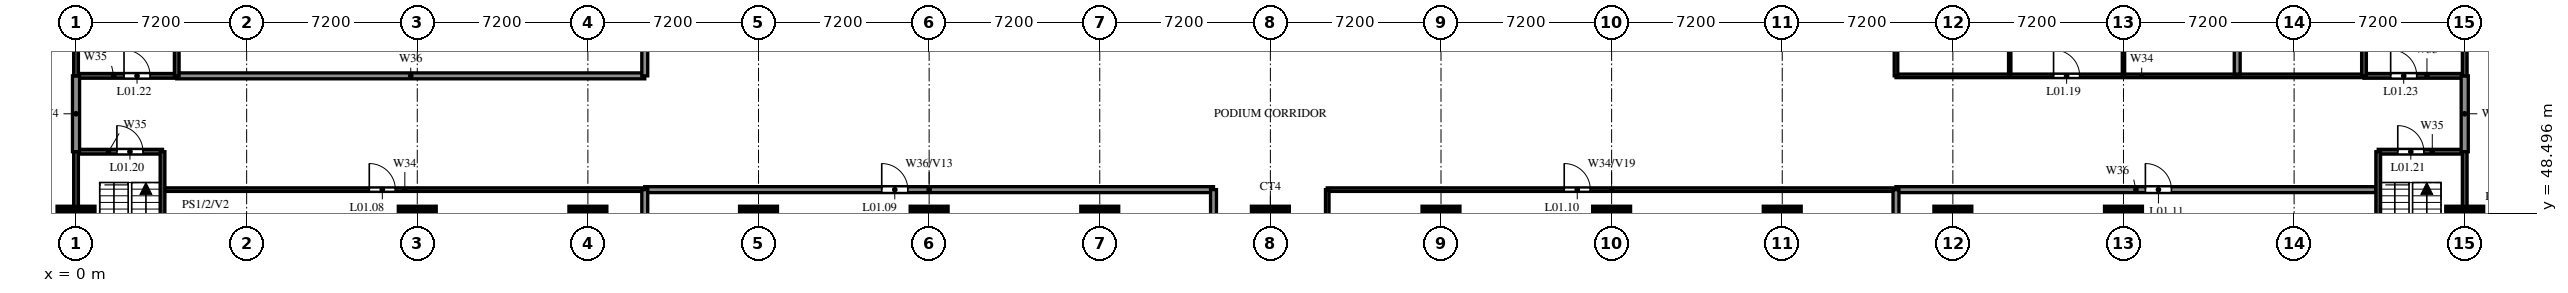
"""IFC4 building model, lengths in metres.
Left out: names, types, materials, properties, quantities, classifications, styles, units other than length and angle.
Written with IfcOpenShell. Run it as: python <this file> out.ifc"""

import sys

from ifc_helpers import new_model, si_unit, direction, frame, frame_2d, origin, origin_2d, place, context, subcontext, project, spatial, rectangle, circle, extrude, source, transform, mapped, element, fill, save


model = new_model("IFC4")
c1 = context("Model", 3, precision=1e-05, world=origin(), true_north=direction((0.0, 1.0)))
c2 = subcontext(c1, "Body", "Model", "MODEL_VIEW")
j1 = project(units=[si_unit("LENGTHUNIT", "METRE"), si_unit("PLANEANGLEUNIT", "RADIAN")], contexts=[c1])
p1 = place(None, origin())
s1 = spatial("IfcSite", under=j1, at=p1, CompositionType="ELEMENT")
p2 = place(p1, origin())
s2 = spatial("IfcBuilding", under=s1, at=p2, CompositionType="ELEMENT")
p3 = place(p2, frame((0.0, 0.0, 7.8)))
s3 = spatial("IfcBuildingStorey", under=s2, at=p3, CompositionType="ELEMENT", Elevation=7.8)
m1 = source(origin(), c2, "Body", "SweptSolid", [
    extrude(circle(Radius=0.8, at=origin_2d()), origin(), (0.0, 0.0, 1.0), 5.0),
])
for number, where, z_axis, x_axis in (
    (1, (0.0, 48.0, 0.0), (0.0, 0.0, 1.0), (1.0, 0.0, 0.0)),
    (2, (14.4, 48.0, 0.0), (0.0, 0.0, 1.0), (1.0, 0.0, 0.0)),
    (3, (21.6, 48.0, 0.0), (0.0, 0.0, 1.0), (1.0, 0.0, 0.0)),
    (4, (28.8, 48.0, 0.0), (0.0, 0.0, 1.0), (1.0, 0.0, 0.0)),
    (5, (36.0, 48.0, 0.0), (0.0, 0.0, 1.0), (1.0, 0.0, 0.0)),
    (6, (43.2, 48.0, 0.0), (0.0, 0.0, 1.0), (1.0, 0.0, 0.0)),
    (7, (50.4, 48.0, 0.0), (0.0, 0.0, 1.0), (1.0, 0.0, 0.0)),
    (8, (57.6, 48.0, 0.0), (0.0, 0.0, 1.0), (1.0, 0.0, 0.0)),
    (9, (64.8, 48.0, 0.0), (0.0, 0.0, 1.0), (1.0, 0.0, 0.0)),
    (10, (72.0, 48.0, 0.0), (0.0, 0.0, 1.0), (1.0, 0.0, 0.0)),
    (11, (79.2, 48.0, 0.0), (0.0, 0.0, 1.0), (1.0, 0.0, 0.0)),
    (12, (86.4, 48.0, 0.0), (0.0, 0.0, 1.0), (1.0, 0.0, 0.0)),
    (13, (100.8, 48.0, 0.0), (0.0, 0.0, 1.0), (1.0, 0.0, 0.0)),
):
    element("IfcColumn", number, at=place(p3, frame(where, z_axis=z_axis, x_axis=x_axis)), inside=s3, PredefinedType="COLUMN", context=c2, shape_type="MappedRepresentation", body=[
        mapped(m1, transform((0.0, 0.0, 0.0))),
    ])
p4 = place(p3, frame((3.75, 49.5, 0.0), z_axis=(0.0, 0.0, 1.0), x_axis=(1.0, 0.0, 0.0)))
e14 = element("IfcWall", 14, at=p4, inside=s3, PredefinedType="PARTITIONING", context=c2, shape_type="SweptSolid", body=[
    extrude(rectangle(XDim=20.25, YDim=0.15, at=frame_2d((10.125, 0.0))), origin(), (0.0, 0.0, 1.0), 3.8),
])
p5 = place(p4, frame((8.625, 0.0, 0.0)))
e15 = element("IfcOpeningElement", 15, at=p5, cuts=e14, PredefinedType="OPENING", context=c2, shape_type="SweptSolid", body=[
    extrude(rectangle(XDim=1.1, YDim=2.1, at=frame_2d((0.55, 1.05))), frame((0.0, 0.085, 0.0), z_axis=(0.0, -1.0, 0.0), x_axis=(1.0, 0.0, 0.0)), (0.0, 0.0, 1.0), 0.17),
])
p6 = place(p3, frame((52.8, 49.5, 0.0), z_axis=(0.0, 0.0, 1.0), x_axis=(1.0, 0.0, 0.0)))
e16 = element("IfcWall", 16, at=p6, inside=s3, PredefinedType="PARTITIONING", context=c2, shape_type="SweptSolid", body=[
    extrude(rectangle(XDim=24.0, YDim=0.15, at=frame_2d((12.0, 0.0))), origin(), (0.0, 0.0, 1.0), 5.0),
])
p7 = place(p6, frame((10.0, 0.0, 0.0)))
e17 = element("IfcOpeningElement", 17, at=p7, cuts=e16, PredefinedType="OPENING", context=c2, shape_type="SweptSolid", body=[
    extrude(rectangle(XDim=1.1, YDim=2.1, at=frame_2d((0.55, 1.05))), frame((0.0, 0.085, 0.0), z_axis=(0.0, -1.0, 0.0), x_axis=(1.0, 0.0, 0.0)), (0.0, 0.0, 1.0), 0.17),
])
p8 = place(p3, frame((24.0, 49.5, 0.0), z_axis=(0.0, 0.0, 1.0), x_axis=(1.0, 0.0, 0.0)))
e18 = element("IfcWall", 18, at=p8, inside=s3, PredefinedType="SOLIDWALL", context=c2, shape_type="SweptSolid", body=[
    extrude(rectangle(XDim=24.0, YDim=0.25, at=frame_2d((12.0, 0.0))), origin(), (0.0, 0.0, 1.0), 5.0),
])
p9 = place(p8, frame((10.0, 0.0, 0.0)))
e19 = element("IfcOpeningElement", 19, at=p9, cuts=e18, PredefinedType="OPENING", context=c2, shape_type="SweptSolid", body=[
    extrude(rectangle(XDim=1.1, YDim=2.1, at=frame_2d((0.55, 1.05))), frame((0.0, 0.135, 0.0), z_axis=(0.0, -1.0, 0.0), x_axis=(1.0, 0.0, 0.0)), (0.0, 0.0, 1.0), 0.27),
])
p10 = place(p3, frame((76.8, 49.5, 0.0), z_axis=(0.0, 0.0, 1.0), x_axis=(1.0, 0.0, 0.0)))
e20 = element("IfcWall", 20, at=p10, inside=s3, PredefinedType="SOLIDWALL", context=c2, shape_type="SweptSolid", body=[
    extrude(rectangle(XDim=20.25, YDim=0.25, at=frame_2d((10.125, 0.0))), origin(), (0.0, 0.0, 1.0), 3.8),
])
p11 = place(p10, frame((10.525, 0.0, 0.0)))
e21 = element("IfcOpeningElement", 21, at=p11, cuts=e20, PredefinedType="OPENING", context=c2, shape_type="SweptSolid", body=[
    extrude(rectangle(XDim=1.1, YDim=2.1, at=frame_2d((0.55, 1.05))), frame((0.0, 0.135, 0.0), z_axis=(0.0, -1.0, 0.0), x_axis=(1.0, 0.0, 0.0)), (0.0, 0.0, 1.0), 0.27),
])
p12 = place(p3, frame((0.0, 51.1, 0.0), z_axis=(0.0, 0.0, 1.0), x_axis=(1.0, 0.0, 0.0)))
e22 = element("IfcWall", 22, at=p12, inside=s3, PredefinedType="SOLIDWALL", context=c2, shape_type="SweptSolid", body=[
    extrude(rectangle(XDim=3.65, YDim=0.2, at=frame_2d((1.825, 0.0))), origin(), (0.0, 0.0, 1.0), 5.0),
])
p13 = place(p12, frame((1.725, 0.0, 0.0)))
e23 = element("IfcOpeningElement", 23, at=p13, cuts=e22, PredefinedType="OPENING", context=c2, shape_type="SweptSolid", body=[
    extrude(rectangle(XDim=1.1, YDim=2.1, at=frame_2d((0.55, 1.05))), frame((0.0, 0.11, 0.0), z_axis=(0.0, -1.0, 0.0), x_axis=(1.0, 0.0, 0.0)), (0.0, 0.0, 1.0), 0.22),
])
p14 = place(p3, frame((97.15, 51.1, 0.0), z_axis=(0.0, 0.0, 1.0), x_axis=(1.0, 0.0, 0.0)))
e24 = element("IfcWall", 24, at=p14, inside=s3, PredefinedType="SOLIDWALL", context=c2, shape_type="SweptSolid", body=[
    extrude(rectangle(XDim=3.65, YDim=0.2, at=frame_2d((1.825, 0.0))), origin(), (0.0, 0.0, 1.0), 5.0),
])
p15 = place(p14, frame((0.825, 0.0, 0.0)))
e25 = element("IfcOpeningElement", 25, at=p15, cuts=e24, PredefinedType="OPENING", context=c2, shape_type="SweptSolid", body=[
    extrude(rectangle(XDim=1.1, YDim=2.1, at=frame_2d((0.55, 1.05))), frame((0.0, 0.11, 0.0), z_axis=(0.0, -1.0, 0.0), x_axis=(1.0, 0.0, 0.0)), (0.0, 0.0, 1.0), 0.22),
])
p16 = place(p3, frame((76.8, 54.3, 0.0), z_axis=(0.0, 0.0, 1.0), x_axis=(1.0, 0.0, 0.0)))
e26 = element("IfcWall", 26, at=p16, inside=s3, PredefinedType="PARTITIONING", context=c2, shape_type="SweptSolid", body=[
    extrude(rectangle(XDim=19.75, YDim=0.15, at=frame_2d((9.875, 0.0))), origin(), (0.0, 0.0, 1.0), 3.8),
])
p17 = place(p16, frame((6.65, 0.0, 0.0)))
e27 = element("IfcOpeningElement", 27, at=p17, cuts=e26, PredefinedType="OPENING", context=c2, shape_type="SweptSolid", body=[
    extrude(rectangle(XDim=1.1, YDim=2.1, at=frame_2d((0.55, 1.05))), frame((0.0, 0.085, 0.0), z_axis=(0.0, -1.0, 0.0), x_axis=(1.0, 0.0, 0.0)), (0.0, 0.0, 1.0), 0.17),
])
p18 = place(p3, frame((0.0, 54.3, 0.0), z_axis=(0.0, 0.0, 1.0), x_axis=(1.0, 0.0, 0.0)))
e28 = element("IfcWall", 28, at=p18, inside=s3, PredefinedType="SOLIDWALL", context=c2, shape_type="SweptSolid", body=[
    extrude(rectangle(XDim=4.25, YDim=0.2, at=frame_2d((2.125, 0.0))), origin(), (0.0, 0.0, 1.0), 5.0),
])
p19 = place(p18, frame((2.025, 0.0, 0.0)))
e29 = element("IfcOpeningElement", 29, at=p19, cuts=e28, PredefinedType="OPENING", context=c2, shape_type="SweptSolid", body=[
    extrude(rectangle(XDim=1.1, YDim=2.1, at=frame_2d((0.55, 1.05))), frame((0.0, 0.11, 0.0), z_axis=(0.0, -1.0, 0.0), x_axis=(1.0, 0.0, 0.0)), (0.0, 0.0, 1.0), 0.22),
])
p20 = place(p3, frame((96.55, 54.3, 0.0), z_axis=(0.0, 0.0, 1.0), x_axis=(1.0, 0.0, 0.0)))
e30 = element("IfcWall", 30, at=p20, inside=s3, PredefinedType="SOLIDWALL", context=c2, shape_type="SweptSolid", body=[
    extrude(rectangle(XDim=4.25, YDim=0.2, at=frame_2d((2.125, 0.0))), origin(), (0.0, 0.0, 1.0), 5.0),
])
p21 = place(p20, frame((1.125, 0.0, 0.0)))
e31 = element("IfcOpeningElement", 31, at=p21, cuts=e30, PredefinedType="OPENING", context=c2, shape_type="SweptSolid", body=[
    extrude(rectangle(XDim=1.1, YDim=2.1, at=frame_2d((0.55, 1.05))), frame((0.0, 0.11, 0.0), z_axis=(0.0, -1.0, 0.0), x_axis=(1.0, 0.0, 0.0)), (0.0, 0.0, 1.0), 0.22),
])
p22 = place(p3, frame((4.25, 54.3, 0.0), z_axis=(0.0, 0.0, 1.0), x_axis=(1.0, 0.0, 0.0)))
e32 = element("IfcWall", 32, at=p22, inside=s3, PredefinedType="SOLIDWALL", context=c2, shape_type="SweptSolid", body=[
    extrude(rectangle(XDim=19.75, YDim=0.25, at=frame_2d((9.875, 0.0))), origin(), (0.0, 0.0, 1.0), 3.8),
])
p23 = place(p3, frame((0.0, 51.1, 0.0), z_axis=(0.0, 0.0, 1.0), x_axis=(0.0, 1.0, 0.0)))
e33 = element("IfcWall", 33, at=p23, inside=s3, PredefinedType="SOLIDWALL", context=c2, shape_type="SweptSolid", body=[
    extrude(rectangle(XDim=3.2, YDim=0.3, at=frame_2d((1.6, 0.0))), origin(), (0.0, 0.0, 1.0), 5.0),
])
p24 = place(p3, frame((0.0, 42.9, 0.0), z_axis=(0.0, 0.0, 1.0), x_axis=(0.0, 1.0, 0.0)))
e34 = element("IfcWall", 34, at=p24, inside=s3, PredefinedType="SOLIDWALL", context=c2, shape_type="SweptSolid", body=[
    extrude(rectangle(XDim=8.2, YDim=0.2, at=frame_2d((4.1, 0.0))), origin(), (0.0, 0.0, 1.0), 5.0),
])
p25 = place(p3, frame((0.0, 54.3, 0.0), z_axis=(0.0, 0.0, 1.0), x_axis=(0.0, 1.0, 0.0)))
e35 = element("IfcWall", 35, at=p25, inside=s3, PredefinedType="SOLIDWALL", context=c2, shape_type="SweptSolid", body=[
    extrude(rectangle(XDim=8.8, YDim=0.2, at=frame_2d((4.4, 0.0))), origin(), (0.0, 0.0, 1.0), 5.0),
])
p26 = place(p3, frame((3.65, 42.9, 0.0), z_axis=(0.0, 0.0, 1.0), x_axis=(0.0, 1.0, 0.0)))
e36 = element("IfcWall", 36, at=p26, inside=s3, PredefinedType="SOLIDWALL", context=c2, shape_type="SweptSolid", body=[
    extrude(rectangle(XDim=8.2, YDim=0.2, at=frame_2d((4.1, 0.0))), origin(), (0.0, 0.0, 1.0), 5.0),
])
p27 = place(p3, frame((4.25, 54.3, 0.0), z_axis=(0.0, 0.0, 1.0), x_axis=(0.0, 1.0, 0.0)))
e37 = element("IfcWall", 37, at=p27, inside=s3, PredefinedType="SOLIDWALL", context=c2, shape_type="SweptSolid", body=[
    extrude(rectangle(XDim=8.8, YDim=0.2, at=frame_2d((4.4, 0.0))), origin(), (0.0, 0.0, 1.0), 5.0),
])
p28 = place(p3, frame((24.0, 30.0, 0.0), z_axis=(0.0, 0.0, 1.0), x_axis=(0.0, 1.0, 0.0)))
e38 = element("IfcWall", 38, at=p28, inside=s3, PredefinedType="SOLIDWALL", context=c2, shape_type="SweptSolid", body=[
    extrude(rectangle(XDim=19.5, YDim=0.25, at=frame_2d((9.75, 0.0))), origin(), (0.0, 0.0, 1.0), 4.1),
])
p29 = place(p3, frame((24.0, 54.3, 0.0), z_axis=(0.0, 0.0, 1.0), x_axis=(0.0, 1.0, 0.0)))
e39 = element("IfcWall", 39, at=p29, inside=s3, PredefinedType="SOLIDWALL", context=c2, shape_type="SweptSolid", body=[
    extrude(rectangle(XDim=15.9, YDim=0.25, at=frame_2d((7.95, 0.0))), origin(), (0.0, 0.0, 1.0), 5.0),
])
p30 = place(p29, frame((7.4, 0.0, 0.0)))
e40 = element("IfcOpeningElement", 40, at=p30, cuts=e39, PredefinedType="OPENING", context=c2, shape_type="SweptSolid", body=[
    extrude(rectangle(XDim=1.1, YDim=2.1, at=frame_2d((0.55, 1.05))), frame((0.0, 0.135, 0.0), z_axis=(0.0, -1.0, 0.0), x_axis=(1.0, 0.0, 0.0)), (0.0, 0.0, 1.0), 0.27),
])
p31 = place(p3, frame((48.0, 30.0, 0.0), z_axis=(0.0, 0.0, 1.0), x_axis=(0.0, 1.0, 0.0)))
e41 = element("IfcWall", 41, at=p31, inside=s3, PredefinedType="SOLIDWALL", context=c2, shape_type="SweptSolid", body=[
    extrude(rectangle(XDim=19.5, YDim=0.25, at=frame_2d((9.75, 0.0))), origin(), (0.0, 0.0, 1.0), 4.1),
])
p32 = place(p3, frame((52.8, 30.0, 0.0), z_axis=(0.0, 0.0, 1.0), x_axis=(0.0, 1.0, 0.0)))
e42 = element("IfcWall", 42, at=p32, inside=s3, PredefinedType="PARTITIONING", context=c2, shape_type="SweptSolid", body=[
    extrude(rectangle(XDim=19.5, YDim=0.15, at=frame_2d((9.75, 0.0))), origin(), (0.0, 0.0, 1.0), 4.1),
])
p33 = place(p3, frame((76.8, 54.3, 0.0), z_axis=(0.0, 0.0, 1.0), x_axis=(0.0, 1.0, 0.0)))
e43 = element("IfcWall", 43, at=p33, inside=s3, PredefinedType="PARTITIONING", context=c2, shape_type="SweptSolid", body=[
    extrude(rectangle(XDim=31.95, YDim=0.15, at=frame_2d((15.975, 0.0))), origin(), (0.0, 0.0, 1.0), 3.8),
])
p34 = place(p33, frame((11.0, 0.0, 0.0)))
e44 = element("IfcOpeningElement", 44, at=p34, cuts=e43, PredefinedType="OPENING", context=c2, shape_type="SweptSolid", body=[
    extrude(rectangle(XDim=1.1, YDim=2.1, at=frame_2d((0.55, 1.05))), frame((0.0, 0.085, 0.0), z_axis=(0.0, -1.0, 0.0), x_axis=(1.0, 0.0, 0.0)), (0.0, 0.0, 1.0), 0.17),
])
p35 = place(p33, frame((23.45, 0.0, 0.0)))
e45 = element("IfcOpeningElement", 45, at=p35, cuts=e43, PredefinedType="OPENING", context=c2, shape_type="SweptSolid", body=[
    extrude(rectangle(XDim=1.1, YDim=2.1, at=frame_2d((0.55, 1.05))), frame((0.0, 0.085, 0.0), z_axis=(0.0, -1.0, 0.0), x_axis=(1.0, 0.0, 0.0)), (0.0, 0.0, 1.0), 0.17),
])
p36 = place(p3, frame((76.8, 30.0, 0.0), z_axis=(0.0, 0.0, 1.0), x_axis=(0.0, 1.0, 0.0)))
e46 = element("IfcWall", 46, at=p36, inside=s3, PredefinedType="SOLIDWALL", context=c2, shape_type="SweptSolid", body=[
    extrude(rectangle(XDim=19.5, YDim=0.25, at=frame_2d((9.75, 0.0))), origin(), (0.0, 0.0, 1.0), 4.1),
])
p37 = place(p3, frame((81.6, 54.375, 0.0), z_axis=(0.0, 0.0, 1.0), x_axis=(0.0, 1.0, 0.0)))
e47 = element("IfcWall", 47, at=p37, inside=s3, PredefinedType="PARTITIONING", context=c2, shape_type="SweptSolid", body=[
    extrude(rectangle(XDim=7.0, YDim=0.1, at=frame_2d((3.5, 0.0))), origin(), (0.0, 0.0, 1.0), 5.0),
])
p38 = place(p37, frame((1.525, 0.0, 0.0)))
e48 = element("IfcOpeningElement", 48, at=p38, cuts=e47, PredefinedType="OPENING", context=c2, shape_type="SweptSolid", body=[
    extrude(rectangle(XDim=1.0, YDim=2.1, at=frame_2d((0.5, 1.05))), frame((0.0, 0.06, 0.0), z_axis=(0.0, -1.0, 0.0), x_axis=(1.0, 0.0, 0.0)), (0.0, 0.0, 1.0), 0.12),
])
p39 = place(p37, frame((5.125, 0.0, 0.0)))
e49 = element("IfcOpeningElement", 49, at=p39, cuts=e47, PredefinedType="OPENING", context=c2, shape_type="SweptSolid", body=[
    extrude(rectangle(XDim=1.0, YDim=2.1, at=frame_2d((0.5, 1.05))), frame((0.0, 0.06, 0.0), z_axis=(0.0, -1.0, 0.0), x_axis=(1.0, 0.0, 0.0)), (0.0, 0.0, 1.0), 0.12),
])
p40 = place(p3, frame((86.4, 54.375, 0.0), z_axis=(0.0, 0.0, 1.0), x_axis=(0.0, 1.0, 0.0)))
e50 = element("IfcWall", 50, at=p40, inside=s3, PredefinedType="PARTITIONING", context=c2, shape_type="SweptSolid", body=[
    extrude(rectangle(XDim=7.0, YDim=0.1, at=frame_2d((3.5, 0.0))), origin(), (0.0, 0.0, 1.0), 3.8),
])
p41 = place(p40, frame((3.025, 0.0, 0.0)))
e51 = element("IfcOpeningElement", 51, at=p41, cuts=e50, PredefinedType="OPENING", context=c2, shape_type="SweptSolid", body=[
    extrude(rectangle(XDim=1.0, YDim=2.1, at=frame_2d((0.5, 1.05))), frame((0.0, 0.06, 0.0), z_axis=(0.0, -1.0, 0.0), x_axis=(1.0, 0.0, 0.0)), (0.0, 0.0, 1.0), 0.12),
])
p42 = place(p3, frame((91.2, 54.375, 0.0), z_axis=(0.0, 0.0, 1.0), x_axis=(0.0, 1.0, 0.0)))
e52 = element("IfcWall", 52, at=p42, inside=s3, PredefinedType="SOLIDWALL", context=c2, shape_type="SweptSolid", body=[
    extrude(rectangle(XDim=7.125, YDim=0.25, at=frame_2d((3.562, 0.0))), origin(), (0.0, 0.0, 1.0), 5.0),
])
p43 = place(p3, frame((96.55, 54.3, 0.0), z_axis=(0.0, 0.0, 1.0), x_axis=(0.0, 1.0, 0.0)))
e53 = element("IfcWall", 53, at=p43, inside=s3, PredefinedType="SOLIDWALL", context=c2, shape_type="SweptSolid", body=[
    extrude(rectangle(XDim=8.8, YDim=0.2, at=frame_2d((4.4, 0.0))), origin(), (0.0, 0.0, 1.0), 5.0),
])
p44 = place(p3, frame((97.15, 42.9, 0.0), z_axis=(0.0, 0.0, 1.0), x_axis=(0.0, 1.0, 0.0)))
e54 = element("IfcWall", 54, at=p44, inside=s3, PredefinedType="SOLIDWALL", context=c2, shape_type="SweptSolid", body=[
    extrude(rectangle(XDim=8.2, YDim=0.2, at=frame_2d((4.1, 0.0))), origin(), (0.0, 0.0, 1.0), 5.0),
])
p45 = place(p3, frame((100.8, 51.1, 0.0), z_axis=(0.0, 0.0, 1.0), x_axis=(0.0, 1.0, 0.0)))
e55 = element("IfcWall", 55, at=p45, inside=s3, PredefinedType="SOLIDWALL", context=c2, shape_type="SweptSolid", body=[
    extrude(rectangle(XDim=3.2, YDim=0.3, at=frame_2d((1.6, 0.0))), origin(), (0.0, 0.0, 1.0), 5.0),
])
p46 = place(p3, frame((100.8, 42.9, 0.0), z_axis=(0.0, 0.0, 1.0), x_axis=(0.0, 1.0, 0.0)))
e56 = element("IfcWall", 56, at=p46, inside=s3, PredefinedType="SOLIDWALL", context=c2, shape_type="SweptSolid", body=[
    extrude(rectangle(XDim=8.2, YDim=0.2, at=frame_2d((4.1, 0.0))), origin(), (0.0, 0.0, 1.0), 5.0),
])
p47 = place(p3, frame((100.8, 54.3, 0.0), z_axis=(0.0, 0.0, 1.0), x_axis=(0.0, 1.0, 0.0)))
e57 = element("IfcWall", 57, at=p47, inside=s3, PredefinedType="SOLIDWALL", context=c2, shape_type="SweptSolid", body=[
    extrude(rectangle(XDim=8.8, YDim=0.2, at=frame_2d((4.4, 0.0))), origin(), (0.0, 0.0, 1.0), 5.0),
])
p48 = place(p5, origin())
e58 = element("IfcDoor", 58, at=p48, inside=s3, OperationType="SINGLE_SWING_LEFT", PredefinedType="DOOR", context=c2, shape_type="SweptSolid", body=[
    extrude(rectangle(XDim=1.1, YDim=2.1, at=frame_2d((0.55, 1.05))), frame((0.0, 0.025, 0.0), z_axis=(0.0, -1.0, 0.0), x_axis=(1.0, 0.0, 0.0)), (0.0, 0.0, 1.0), 0.05),
])
fill(e15, e58)
p49 = place(p9, origin())
e59 = element("IfcDoor", 59, at=p49, inside=s3, OperationType="SINGLE_SWING_LEFT", PredefinedType="DOOR", context=c2, shape_type="SweptSolid", body=[
    extrude(rectangle(XDim=1.1, YDim=2.1, at=frame_2d((0.55, 1.05))), frame((0.0, 0.025, 0.0), z_axis=(0.0, -1.0, 0.0), x_axis=(1.0, 0.0, 0.0)), (0.0, 0.0, 1.0), 0.05),
])
fill(e19, e59)
p50 = place(p7, origin())
e60 = element("IfcDoor", 60, at=p50, inside=s3, OperationType="SINGLE_SWING_LEFT", PredefinedType="DOOR", context=c2, shape_type="SweptSolid", body=[
    extrude(rectangle(XDim=1.1, YDim=2.1, at=frame_2d((0.55, 1.05))), frame((0.0, 0.025, 0.0), z_axis=(0.0, -1.0, 0.0), x_axis=(1.0, 0.0, 0.0)), (0.0, 0.0, 1.0), 0.05),
])
fill(e17, e60)
p51 = place(p11, origin())
e61 = element("IfcDoor", 61, at=p51, inside=s3, OperationType="SINGLE_SWING_RIGHT", PredefinedType="DOOR", context=c2, shape_type="SweptSolid", body=[
    extrude(rectangle(XDim=1.1, YDim=2.1, at=frame_2d((0.55, 1.05))), frame((0.0, 0.025, 0.0), z_axis=(0.0, -1.0, 0.0), x_axis=(1.0, 0.0, 0.0)), (0.0, 0.0, 1.0), 0.05),
])
fill(e21, e61)
p52 = place(p17, origin())
e62 = element("IfcDoor", 62, at=p52, inside=s3, OperationType="SINGLE_SWING_LEFT", PredefinedType="DOOR", context=c2, shape_type="SweptSolid", body=[
    extrude(rectangle(XDim=1.1, YDim=2.1, at=frame_2d((0.55, 1.05))), frame((0.0, 0.025, 0.0), z_axis=(0.0, -1.0, 0.0), x_axis=(1.0, 0.0, 0.0)), (0.0, 0.0, 1.0), 0.05),
])
fill(e27, e62)
p53 = place(p13, origin())
e63 = element("IfcDoor", 63, at=p53, inside=s3, OperationType="SINGLE_SWING_RIGHT", PredefinedType="DOOR", context=c2, shape_type="SweptSolid", body=[
    extrude(rectangle(XDim=1.1, YDim=2.1, at=frame_2d((0.55, 1.05))), frame((0.0, 0.025, 0.0), z_axis=(0.0, -1.0, 0.0), x_axis=(1.0, 0.0, 0.0)), (0.0, 0.0, 1.0), 0.05),
])
fill(e23, e63)
p54 = place(p15, origin())
e64 = element("IfcDoor", 64, at=p54, inside=s3, OperationType="SINGLE_SWING_LEFT", PredefinedType="DOOR", context=c2, shape_type="SweptSolid", body=[
    extrude(rectangle(XDim=1.1, YDim=2.1, at=frame_2d((0.55, 1.05))), frame((0.0, 0.025, 0.0), z_axis=(0.0, -1.0, 0.0), x_axis=(1.0, 0.0, 0.0)), (0.0, 0.0, 1.0), 0.05),
])
fill(e25, e64)
p55 = place(p19, origin())
e65 = element("IfcDoor", 65, at=p55, inside=s3, OperationType="SINGLE_SWING_RIGHT", PredefinedType="DOOR", context=c2, shape_type="SweptSolid", body=[
    extrude(rectangle(XDim=1.1, YDim=2.1, at=frame_2d((0.55, 1.05))), frame((0.0, 0.025, 0.0), z_axis=(0.0, -1.0, 0.0), x_axis=(1.0, 0.0, 0.0)), (0.0, 0.0, 1.0), 0.05),
])
fill(e29, e65)
p56 = place(p21, origin())
e66 = element("IfcDoor", 66, at=p56, inside=s3, OperationType="SINGLE_SWING_LEFT", PredefinedType="DOOR", context=c2, shape_type="SweptSolid", body=[
    extrude(rectangle(XDim=1.1, YDim=2.1, at=frame_2d((0.55, 1.05))), frame((0.0, 0.025, 0.0), z_axis=(0.0, -1.0, 0.0), x_axis=(1.0, 0.0, 0.0)), (0.0, 0.0, 1.0), 0.05),
])
fill(e31, e66)
save(model, sys.argv[1])
